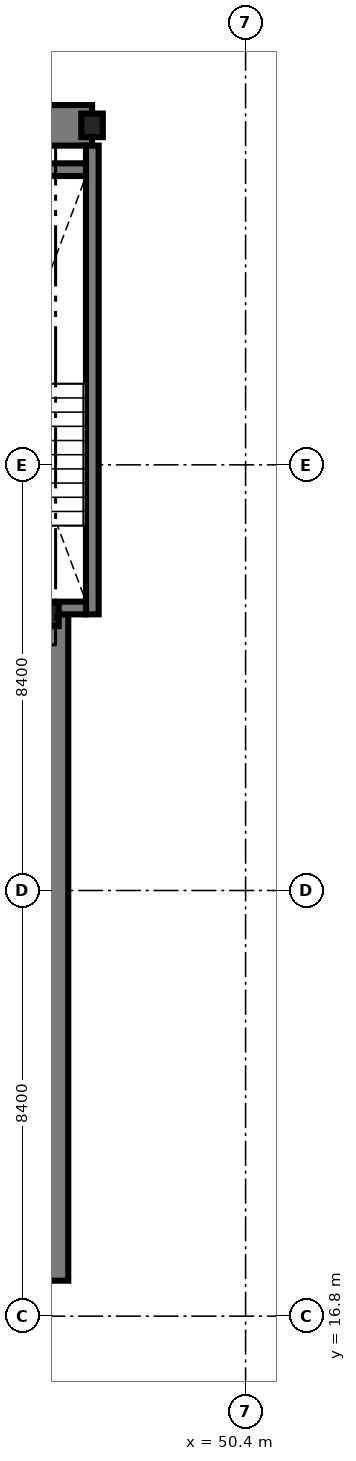
"""IFC4 building model, lengths in metres.
Left out: names, types, materials, properties, quantities, classifications, styles, units other than length and angle.
Written with IfcOpenShell. Run it as: python <this file> out.ifc"""

import sys

from ifc_helpers import new_model, si_unit, direction, frame, frame_2d, origin, origin_2d, place, context, subcontext, project, spatial, rectangle, i_section, extrude, source, transform, mapped, element, save


model = new_model("IFC4")
c1 = context("Model", 3, precision=1e-05, world=origin(), true_north=direction((0.0, 1.0)))
c2 = subcontext(c1, "Body", "Model", "MODEL_VIEW")
j1 = project(units=[si_unit("LENGTHUNIT", "METRE"), si_unit("PLANEANGLEUNIT", "RADIAN")], contexts=[c1])
p1 = place(None, origin())
s1 = spatial("IfcSite", under=j1, at=p1, CompositionType="ELEMENT")
p2 = place(p1, origin())
s2 = spatial("IfcBuilding", under=s1, at=p2, CompositionType="ELEMENT")
p3 = place(p2, frame((0.0, 0.0, 137.2)))
s3 = spatial("IfcBuildingStorey", under=s2, at=p3, CompositionType="ELEMENT", Elevation=137.2)
m1 = source(origin(), c2, "Body", "SweptSolid", [
    extrude(rectangle(XDim=17.52, YDim=0.8, at=frame_2d((8.76, 0.0))), origin(), (0.0, 0.0, 1.0), 3.46),
])
p4 = place(p3, frame((29.85, 40.3, 0.0), z_axis=(0.0, 0.0, 1.0), x_axis=(1.0, 0.0, 0.0)))
e1 = element("IfcWall", 1, at=p4, inside=s3, PredefinedType="SHEAR", context=c2, shape_type="MappedRepresentation", body=[
    mapped(m1, transform((0.0, 0.0, 0.0), scale=1.0)),
])
m2 = source(origin(), c2, "Body", "SweptSolid", [
    extrude(rectangle(XDim=13.15, YDim=0.8, at=frame_2d((6.575, 0.0))), origin(), (0.0, 0.0, 1.0), 3.46),
])
p5 = place(p3, frame((46.5, 17.5, 0.0), z_axis=(0.0, 0.0, 1.0), x_axis=(0.0, 1.0, 0.0)))
e2 = element("IfcWall", 2, at=p5, inside=s3, PredefinedType="SHEAR", context=c2, shape_type="MappedRepresentation", body=[
    mapped(m2, transform((0.0, 0.0, 0.0), scale=1.0)),
])
m3 = source(origin(), c2, "Body", "SweptSolid", [
    extrude(i_section(OverallWidth=0.424, OverallDepth=0.465, WebThickness=0.035, FlangeThickness=0.056, FilletRadius=0.015, at=origin_2d()), origin(), (0.0, 0.0, 1.0), 3.46),
])
for number, where, z_axis, x_axis in (
    (3, (46.5, 30.65, 0.0), (0.0, 0.0, 1.0), (1.0, 0.0, 0.0)),
    (4, (47.37, 40.3, 0.0), (0.0, 0.0, 1.0), (1.0, 0.0, 0.0)),
):
    element("IfcColumn", number, at=place(p3, frame(where, z_axis=z_axis, x_axis=x_axis)), inside=s3, PredefinedType="COLUMN", context=c2, shape_type="MappedRepresentation", body=[
        mapped(m3, transform((0.0, 0.0, 0.0), scale=1.0)),
    ])
m4 = source(origin(), c2, "Body", "SweptSolid", [
    extrude(rectangle(XDim=9.25, YDim=0.25, at=frame_2d((4.625, 0.0))), origin(), (0.0, 0.0, 1.0), 3.5),
])
p6 = place(p3, frame((47.375, 30.65, 0.0), z_axis=(0.0, 0.0, 1.0), x_axis=(0.0, 1.0, 0.0)))
e5 = element("IfcWall", 5, at=p6, inside=s3, PredefinedType="SOLIDWALL", context=c2, shape_type="MappedRepresentation", body=[
    mapped(m4, transform((0.0, 0.0, 0.0), scale=1.0)),
])
m5 = source(origin(), c2, "Body", "SweptSolid", [
    extrude(rectangle(XDim=3.15, YDim=0.25, at=frame_2d((1.575, 0.0))), origin(), (0.0, 0.0, 1.0), 3.5),
])
p7 = place(p3, frame((44.1, 39.425, 0.0), z_axis=(0.0, 0.0, 1.0), x_axis=(1.0, 0.0, 0.0)))
e6 = element("IfcWall", 6, at=p7, inside=s3, PredefinedType="SOLIDWALL", context=c2, shape_type="MappedRepresentation", body=[
    mapped(m5, transform((0.0, 0.0, 0.0), scale=1.0)),
])
p8 = place(p3, frame((44.1, 30.775, 0.0), z_axis=(0.0, 0.0, 1.0), x_axis=(1.0, 0.0, 0.0)))
e7 = element("IfcWall", 7, at=p8, inside=s3, PredefinedType="SOLIDWALL", context=c2, shape_type="MappedRepresentation", body=[
    mapped(m5, transform((0.0, 0.0, 0.0), scale=1.0)),
])
m6 = source(origin(), c2, "Body", "SweptSolid", [
    extrude(rectangle(XDim=1.1, YDim=2.2, at=frame_2d((0.55, 1.1))), frame((0.0, 0.135, 0.0), z_axis=(0.0, -1.0, 0.0), x_axis=(1.0, 0.0, 0.0)), (0.0, 0.0, 1.0), 0.27),
])
p9 = place(p8, frame((0.35, 0.0, 0.0)))
e8 = element("IfcOpeningElement", 8, at=p9, cuts=e7, PredefinedType="OPENING", context=c2, shape_type="MappedRepresentation", body=[
    mapped(m6, transform((0.0, 0.0, 0.0), scale=1.0)),
])
save(model, sys.argv[1])
